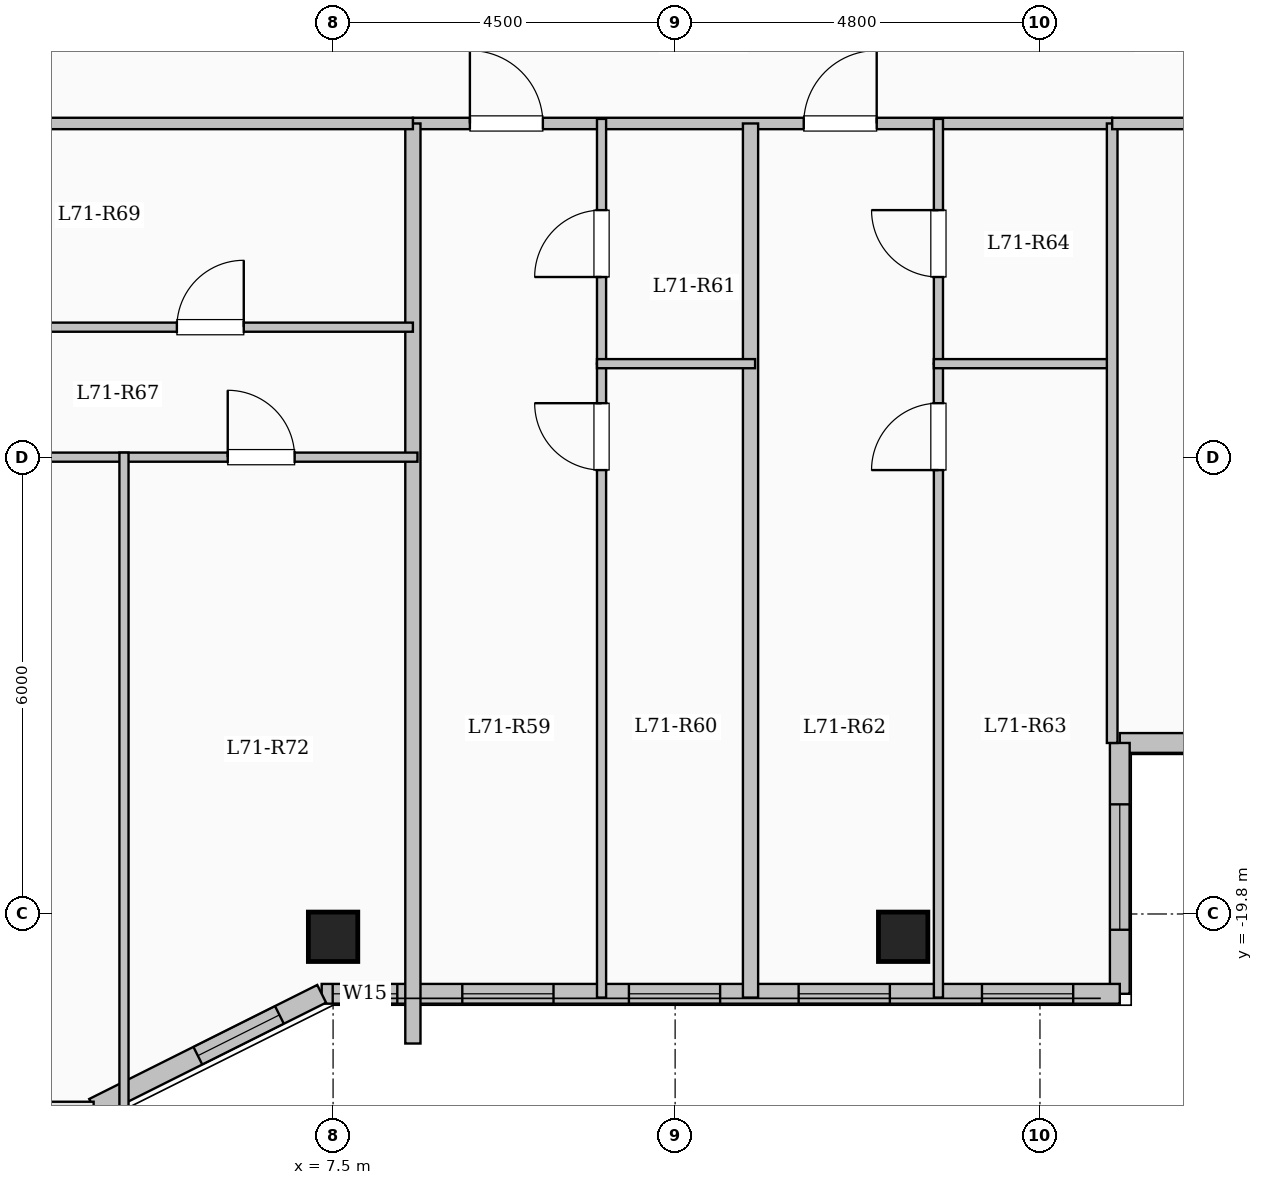
"""IFC4 building model, lengths in metres.
Left out: names, types, materials, properties, quantities, classifications, styles, units other than length and angle.
Written with IfcOpenShell. Run it as: python <this file> out.ifc"""

import sys

from ifc_helpers import new_model, si_unit, direction, frame, frame_2d, origin, origin_2d, place, context, subcontext, project, spatial, rectangle, extrude, element, fill, save


model = new_model("IFC4")
c1 = context("Model", 3, precision=1e-05, world=origin(), true_north=direction((0.0, 1.0)))
c2 = subcontext(c1, "Body", "Model", "MODEL_VIEW")
j1 = project(units=[si_unit("LENGTHUNIT", "METRE"), si_unit("PLANEANGLEUNIT", "RADIAN")], contexts=[c1])
p1 = place(None, origin())
s1 = spatial("IfcSite", under=j1, at=p1, CompositionType="ELEMENT")
p2 = place(p1, origin())
s2 = spatial("IfcBuilding", under=s1, at=p2, CompositionType="ELEMENT")
p3 = place(p2, frame((0.0, 0.0, 261.6)))
s3 = spatial("IfcBuildingStorey", under=s2, at=p3, CompositionType="ELEMENT", Elevation=261.6)
for number, where, z_axis, x_axis in (
    (1, (7.5, -20.1, 0.0), (0.0, 0.0, 1.0), (1.0, 0.0, 0.0)),
    (2, (15.0, -20.1, 0.0), (0.0, 0.0, 1.0), (1.0, 0.0, 0.0)),
):
    element("IfcColumn", number, at=place(p3, frame(where, z_axis=z_axis, x_axis=x_axis)), inside=s3, PredefinedType="COLUMN", context=c2, shape_type="SweptSolid", body=[
        extrude(rectangle(XDim=0.65, YDim=0.65, at=origin_2d()), origin(), (0.0, 0.0, 1.0), 3.35),
    ])
p4 = place(p3, frame((22.65, -17.55, 0.0), z_axis=(0.0, 0.0, 1.0), x_axis=(-1.0, 0.0, 0.0)))
e3 = element("IfcWall", 3, at=p4, inside=s3, PredefinedType="SOLIDWALL", context=c2, shape_type="SweptSolid", body=[
    extrude(rectangle(XDim=4.8, YDim=0.26, at=frame_2d((2.4, 0.0))), origin(), (0.0, 0.0, 1.0), 3.1),
])
p5 = place(p4, frame((1.325, 0.0, 0.9)))
e4 = element("IfcOpeningElement", 4, at=p5, cuts=e3, PredefinedType="OPENING", context=c2, shape_type="SweptSolid", body=[
    extrude(rectangle(XDim=2.2, YDim=1.75, at=frame_2d((1.1, 0.875))), frame((0.0, 0.14, 0.0), z_axis=(0.0, -1.0, 0.0), x_axis=(1.0, 0.0, 0.0)), (0.0, 0.0, 1.0), 0.28),
])
p6 = place(p3, frame((17.85, -17.55, 0.0), z_axis=(0.0, 0.0, 1.0), x_axis=(0.0, -1.0, 0.0)))
e5 = element("IfcWall", 5, at=p6, inside=s3, PredefinedType="SOLIDWALL", context=c2, shape_type="SweptSolid", body=[
    extrude(rectangle(XDim=3.3, YDim=0.26, at=frame_2d((1.65, 0.0))), origin(), (0.0, 0.0, 1.0), 3.1),
])
p7 = place(p6, frame((0.808, 0.0, 0.9)))
e6 = element("IfcOpeningElement", 6, at=p7, cuts=e5, PredefinedType="OPENING", context=c2, shape_type="SweptSolid", body=[
    extrude(rectangle(XDim=1.65, YDim=1.6, at=frame_2d((0.825, 0.8))), frame((0.0, 0.14, 0.0), z_axis=(0.0, -1.0, 0.0), x_axis=(1.0, 0.0, 0.0)), (0.0, 0.0, 1.0), 0.28),
])
p8 = place(p3, frame((17.85, -20.85, 0.0), z_axis=(0.0, 0.0, 1.0), x_axis=(-1.0, 0.0, 0.0)))
e7 = element("IfcWall", 7, at=p8, inside=s3, PredefinedType="SOLIDWALL", context=c2, shape_type="SweptSolid", body=[
    extrude(rectangle(XDim=10.5, YDim=0.26, at=frame_2d((5.25, 0.0))), origin(), (0.0, 0.0, 1.0), 3.1),
])
p9 = place(p8, frame((0.613, 0.0, 0.95)))
e8 = element("IfcOpeningElement", 8, at=p9, cuts=e7, PredefinedType="OPENING", context=c2, shape_type="SweptSolid", body=[
    extrude(rectangle(XDim=1.2, YDim=1.5, at=frame_2d((0.6, 0.75))), frame((0.0, 0.14, 0.0), z_axis=(0.0, -1.0, 0.0), x_axis=(1.0, 0.0, 0.0)), (0.0, 0.0, 1.0), 0.28),
])
p10 = place(p8, frame((3.025, 0.0, 0.95)))
e9 = element("IfcOpeningElement", 9, at=p10, cuts=e7, PredefinedType="OPENING", context=c2, shape_type="SweptSolid", body=[
    extrude(rectangle(XDim=1.2, YDim=1.5, at=frame_2d((0.6, 0.75))), frame((0.0, 0.14, 0.0), z_axis=(0.0, -1.0, 0.0), x_axis=(1.0, 0.0, 0.0)), (0.0, 0.0, 1.0), 0.28),
])
p11 = place(p8, frame((5.258, 0.0, 0.95)))
e10 = element("IfcOpeningElement", 10, at=p11, cuts=e7, PredefinedType="OPENING", context=c2, shape_type="SweptSolid", body=[
    extrude(rectangle(XDim=1.2, YDim=1.5, at=frame_2d((0.6, 0.75))), frame((0.0, 0.14, 0.0), z_axis=(0.0, -1.0, 0.0), x_axis=(1.0, 0.0, 0.0)), (0.0, 0.0, 1.0), 0.28),
])
p12 = place(p8, frame((7.45, 0.0, 0.95)))
e11 = element("IfcOpeningElement", 11, at=p12, cuts=e7, PredefinedType="OPENING", context=c2, shape_type="SweptSolid", body=[
    extrude(rectangle(XDim=1.2, YDim=1.5, at=frame_2d((0.6, 0.75))), frame((0.0, 0.14, 0.0), z_axis=(0.0, -1.0, 0.0), x_axis=(1.0, 0.0, 0.0)), (0.0, 0.0, 1.0), 0.28),
])
p13 = place(p8, frame((9.505, 0.0, 0.95)))
e12 = element("IfcOpeningElement", 12, at=p13, cuts=e7, PredefinedType="OPENING", context=c2, shape_type="SweptSolid", body=[
    extrude(rectangle(XDim=0.85, YDim=1.5, at=frame_2d((0.425, 0.75))), frame((0.0, 0.14, 0.0), z_axis=(0.0, -1.0, 0.0), x_axis=(1.0, 0.0, 0.0)), (0.0, 0.0, 1.0), 0.28),
])
p14 = place(p3, frame((7.35, -20.85, 0.0), z_axis=(0.0, 0.0, 1.0), x_axis=(-0.894427191, -0.4472135955, 0.0)))
e13 = element("IfcWall", 13, at=p14, inside=s3, PredefinedType="SOLIDWALL", context=c2, shape_type="SweptSolid", body=[
    extrude(rectangle(XDim=3.354, YDim=0.26, at=frame_2d((1.677, 0.0))), origin(), (0.0, 0.0, 1.0), 3.1),
])
p15 = place(p14, frame((0.622, 0.0, 0.95)))
e14 = element("IfcOpeningElement", 14, at=p15, cuts=e13, PredefinedType="OPENING", context=c2, shape_type="SweptSolid", body=[
    extrude(rectangle(XDim=1.2, YDim=1.5, at=frame_2d((0.6, 0.75))), frame((0.0, 0.14, 0.0), z_axis=(0.0, -1.0, 0.0), x_axis=(1.0, 0.0, 0.0)), (0.0, 0.0, 1.0), 0.28),
])
p16 = place(p3, frame((8.55, -9.4, 0.0), z_axis=(0.0, 0.0, 1.0), x_axis=(1.0, 0.0, 0.0)))
e15 = element("IfcWall", 15, at=p16, inside=s3, PredefinedType="PARTITIONING", context=c2, shape_type="SweptSolid", body=[
    extrude(rectangle(XDim=9.2, YDim=0.15, at=frame_2d((4.6, 0.0))), origin(), (0.0, 0.0, 1.0), 3.1),
])
p17 = place(p16, frame((0.75, 0.0, 0.0)))
e16 = element("IfcOpeningElement", 16, at=p17, cuts=e15, PredefinedType="OPENING", context=c2, shape_type="SweptSolid", body=[
    extrude(rectangle(XDim=0.96, YDim=2.15, at=frame_2d((0.48, 1.075))), frame((0.0, 0.085, 0.0), z_axis=(0.0, -1.0, 0.0), x_axis=(1.0, 0.0, 0.0)), (0.0, 0.0, 1.0), 0.17),
])
p18 = place(p16, frame((5.142, 0.0, 0.0)))
e17 = element("IfcOpeningElement", 17, at=p18, cuts=e15, PredefinedType="OPENING", context=c2, shape_type="SweptSolid", body=[
    extrude(rectangle(XDim=0.96, YDim=2.15, at=frame_2d((0.48, 1.075))), frame((0.0, 0.085, 0.0), z_axis=(0.0, -1.0, 0.0), x_axis=(1.0, 0.0, 0.0)), (0.0, 0.0, 1.0), 0.17),
])
p19 = place(p3, frame((12.992, -20.9, 0.0), z_axis=(0.0, 0.0, 1.0), x_axis=(0.0, 1.0, 0.0)))
e18 = element("IfcWall", 18, at=p19, inside=s3, PredefinedType="SOLIDWALL", context=c2, shape_type="SweptSolid", body=[
    extrude(rectangle(XDim=11.5, YDim=0.2, at=frame_2d((5.75, 0.0))), origin(), (0.0, 0.0, 1.0), 3.1),
])
p20 = place(p3, frame((11.032, -20.9, 0.0), z_axis=(0.0, 0.0, 1.0), x_axis=(0.0, 1.0, 0.0)))
e19 = element("IfcWall", 19, at=p20, inside=s3, PredefinedType="PARTITIONING", context=c2, shape_type="SweptSolid", body=[
    extrude(rectangle(XDim=8.34, YDim=0.12, at=frame_2d((4.17, 0.0))), origin(), (0.0, 0.0, 1.0), 3.1),
])
p21 = place(p20, frame((6.94, 0.0, 0.0)))
e20 = element("IfcOpeningElement", 20, at=p21, cuts=e19, PredefinedType="OPENING", context=c2, shape_type="SweptSolid", body=[
    extrude(rectangle(XDim=0.88, YDim=2.1, at=frame_2d((0.44, 1.05))), frame((0.0, 0.07, 0.0), z_axis=(0.0, -1.0, 0.0), x_axis=(1.0, 0.0, 0.0)), (0.0, 0.0, 1.0), 0.14),
])
p22 = place(p3, frame((11.032, -12.56, 0.0), z_axis=(0.0, 0.0, 1.0), x_axis=(0.0, 1.0, 0.0)))
e21 = element("IfcWall", 21, at=p22, inside=s3, PredefinedType="PARTITIONING", context=c2, shape_type="SweptSolid", body=[
    extrude(rectangle(XDim=3.22, YDim=0.12, at=frame_2d((1.61, 0.0))), origin(), (0.0, 0.0, 1.0), 3.1),
])
p23 = place(p22, frame((1.14, 0.0, 0.0)))
e22 = element("IfcOpeningElement", 22, at=p23, cuts=e21, PredefinedType="OPENING", context=c2, shape_type="SweptSolid", body=[
    extrude(rectangle(XDim=0.88, YDim=2.1, at=frame_2d((0.44, 1.05))), frame((0.0, 0.07, 0.0), z_axis=(0.0, -1.0, 0.0), x_axis=(1.0, 0.0, 0.0)), (0.0, 0.0, 1.0), 0.14),
])
p24 = place(p3, frame((10.972, -12.56, 0.0), z_axis=(0.0, 0.0, 1.0), x_axis=(1.0, 0.0, 0.0)))
e23 = element("IfcWall", 23, at=p24, inside=s3, PredefinedType="PARTITIONING", context=c2, shape_type="SweptSolid", body=[
    extrude(rectangle(XDim=2.08, YDim=0.12, at=frame_2d((1.04, 0.0))), origin(), (0.0, 0.0, 1.0), 2.785),
])
p25 = place(p3, frame((15.464, -20.9, 0.0), z_axis=(0.0, 0.0, 1.0), x_axis=(0.0, 1.0, 0.0)))
e24 = element("IfcWall", 24, at=p25, inside=s3, PredefinedType="PARTITIONING", context=c2, shape_type="SweptSolid", body=[
    extrude(rectangle(XDim=8.34, YDim=0.12, at=frame_2d((4.17, 0.0))), origin(), (0.0, 0.0, 1.0), 3.1),
])
p26 = place(p25, frame((6.94, 0.0, 0.0)))
e25 = element("IfcOpeningElement", 25, at=p26, cuts=e24, PredefinedType="OPENING", context=c2, shape_type="SweptSolid", body=[
    extrude(rectangle(XDim=0.88, YDim=2.1, at=frame_2d((0.44, 1.05))), frame((0.0, 0.07, 0.0), z_axis=(0.0, -1.0, 0.0), x_axis=(1.0, 0.0, 0.0)), (0.0, 0.0, 1.0), 0.14),
])
p27 = place(p3, frame((15.464, -12.56, 0.0), z_axis=(0.0, 0.0, 1.0), x_axis=(0.0, 1.0, 0.0)))
e26 = element("IfcWall", 26, at=p27, inside=s3, PredefinedType="PARTITIONING", context=c2, shape_type="SweptSolid", body=[
    extrude(rectangle(XDim=3.22, YDim=0.12, at=frame_2d((1.61, 0.0))), origin(), (0.0, 0.0, 1.0), 3.1),
])
p28 = place(p27, frame((1.14, 0.0, 0.0)))
e27 = element("IfcOpeningElement", 27, at=p28, cuts=e26, PredefinedType="OPENING", context=c2, shape_type="SweptSolid", body=[
    extrude(rectangle(XDim=0.88, YDim=2.1, at=frame_2d((0.44, 1.05))), frame((0.0, 0.07, 0.0), z_axis=(0.0, -1.0, 0.0), x_axis=(1.0, 0.0, 0.0)), (0.0, 0.0, 1.0), 0.14),
])
p29 = place(p3, frame((15.404, -12.56, 0.0), z_axis=(0.0, 0.0, 1.0), x_axis=(1.0, 0.0, 0.0)))
e28 = element("IfcWall", 28, at=p29, inside=s3, PredefinedType="PARTITIONING", context=c2, shape_type="SweptSolid", body=[
    extrude(rectangle(XDim=2.406, YDim=0.12, at=frame_2d((1.203, 0.0))), origin(), (0.0, 0.0, 1.0), 3.1),
])
p30 = place(p3, frame((8.55, -21.504, 0.0), z_axis=(0.0, 0.0, 1.0), x_axis=(0.0, 1.0, 0.0)))
e29 = element("IfcWall", 29, at=p30, inside=s3, PredefinedType="SOLIDWALL", context=c2, shape_type="SweptSolid", body=[
    extrude(rectangle(XDim=12.104, YDim=0.2, at=frame_2d((6.052, 0.0))), origin(), (0.0, 0.0, 1.0), 3.1),
])
p31 = place(p3, frame((-8.55, -9.4, 0.0), z_axis=(0.0, 0.0, 1.0), x_axis=(1.0, 0.0, 0.0)))
e30 = element("IfcWall", 30, at=p31, inside=s3, PredefinedType="PARTITIONING", context=c2, shape_type="SweptSolid", body=[
    extrude(rectangle(XDim=17.1, YDim=0.15, at=frame_2d((8.55, 0.0))), origin(), (0.0, 0.0, 1.0), 3.1),
])
p32 = place(p31, frame((1.75, 0.0, 0.0)))
e31 = element("IfcOpeningElement", 31, at=p32, cuts=e30, PredefinedType="OPENING", context=c2, shape_type="SweptSolid", body=[
    extrude(rectangle(XDim=0.96, YDim=2.15, at=frame_2d((0.48, 1.075))), frame((0.0, 0.085, 0.0), z_axis=(0.0, -1.0, 0.0), x_axis=(1.0, 0.0, 0.0)), (0.0, 0.0, 1.0), 0.17),
])
p33 = place(p3, frame((3.219, -12.08, 0.0), z_axis=(0.0, 0.0, 1.0), x_axis=(1.0, 0.0, 0.0)))
e32 = element("IfcWall", 32, at=p33, inside=s3, PredefinedType="PARTITIONING", context=c2, shape_type="SweptSolid", body=[
    extrude(rectangle(XDim=5.331, YDim=0.12, at=frame_2d((2.666, 0.0))), origin(), (0.0, 0.0, 1.0), 2.785),
])
p34 = place(p33, frame((2.226, 0.0, 0.0)))
e33 = element("IfcOpeningElement", 33, at=p34, cuts=e32, PredefinedType="OPENING", context=c2, shape_type="SweptSolid", body=[
    extrude(rectangle(XDim=0.88, YDim=2.1, at=frame_2d((0.44, 1.05))), frame((0.0, 0.07, 0.0), z_axis=(0.0, -1.0, 0.0), x_axis=(1.0, 0.0, 0.0)), (0.0, 0.0, 1.0), 0.14),
])
p35 = place(p3, frame((-2.774, -13.79, 0.0), z_axis=(0.0, 0.0, 1.0), x_axis=(1.0, 0.0, 0.0)))
e34 = element("IfcWall", 34, at=p35, inside=s3, PredefinedType="PARTITIONING", context=c2, shape_type="SweptSolid", body=[
    extrude(rectangle(XDim=11.384, YDim=0.12, at=frame_2d((5.692, 0.0))), origin(), (0.0, 0.0, 1.0), 2.785),
])
p36 = place(p35, frame((1.426, 0.0, 0.0)))
e35 = element("IfcOpeningElement", 35, at=p36, cuts=e34, PredefinedType="OPENING", context=c2, shape_type="SweptSolid", body=[
    extrude(rectangle(XDim=0.88, YDim=2.1, at=frame_2d((0.44, 1.05))), frame((0.0, 0.07, 0.0), z_axis=(0.0, -1.0, 0.0), x_axis=(1.0, 0.0, 0.0)), (0.0, 0.0, 1.0), 0.14),
])
p37 = place(p35, frame((5.157, 0.0, 0.0)))
e36 = element("IfcOpeningElement", 36, at=p37, cuts=e34, PredefinedType="OPENING", context=c2, shape_type="SweptSolid", body=[
    extrude(rectangle(XDim=0.88, YDim=2.1, at=frame_2d((0.44, 1.05))), frame((0.0, 0.07, 0.0), z_axis=(0.0, -1.0, 0.0), x_axis=(1.0, 0.0, 0.0)), (0.0, 0.0, 1.0), 0.14),
])
p38 = place(p35, frame((8.888, 0.0, 0.0)))
e37 = element("IfcOpeningElement", 37, at=p38, cuts=e34, PredefinedType="OPENING", context=c2, shape_type="SweptSolid", body=[
    extrude(rectangle(XDim=0.88, YDim=2.1, at=frame_2d((0.44, 1.05))), frame((0.0, 0.07, 0.0), z_axis=(0.0, -1.0, 0.0), x_axis=(1.0, 0.0, 0.0)), (0.0, 0.0, 1.0), 0.14),
])
p39 = place(p3, frame((4.749, -22.38, 0.0), z_axis=(0.0, 0.0, 1.0), x_axis=(0.0, 1.0, 0.0)))
e38 = element("IfcWall", 38, at=p39, inside=s3, PredefinedType="PARTITIONING", context=c2, shape_type="SweptSolid", body=[
    extrude(rectangle(XDim=8.65, YDim=0.12, at=frame_2d((4.325, 0.0))), origin(), (0.0, 0.0, 1.0), 3.1),
])
p40 = place(p3, frame((17.75, -17.55, 0.0), z_axis=(0.0, 0.0, 1.0), x_axis=(0.0, 1.0, 0.0)))
e39 = element("IfcWall", 39, at=p40, inside=s3, PredefinedType="PARTITIONING", context=c2, shape_type="SweptSolid", body=[
    extrude(rectangle(XDim=8.15, YDim=0.14, at=frame_2d((4.075, 0.0))), origin(), (0.0, 0.0, 1.0), 3.1),
])
p41 = place(p3, frame((17.75, -9.4, 0.0), z_axis=(0.0, 0.0, 1.0), x_axis=(1.0, 0.0, 0.0)))
e40 = element("IfcWall", 40, at=p41, inside=s3, PredefinedType="PARTITIONING", context=c2, shape_type="SweptSolid", body=[
    extrude(rectangle(XDim=4.93, YDim=0.15, at=frame_2d((2.465, 0.0))), origin(), (0.0, 0.0, 1.0), 3.1),
])
p42 = place(p41, frame((1.99, 0.0, 0.0)))
e41 = element("IfcOpeningElement", 41, at=p42, cuts=e40, PredefinedType="OPENING", context=c2, shape_type="SweptSolid", body=[
    extrude(rectangle(XDim=0.95, YDim=2.15, at=frame_2d((0.475, 1.075))), frame((0.0, 0.085, 0.0), z_axis=(0.0, -1.0, 0.0), x_axis=(1.0, 0.0, 0.0)), (0.0, 0.0, 1.0), 0.17),
])
p43 = place(p7, origin())
e42 = element("IfcWindow", 42, at=p43, inside=s3, PartitioningType="SINGLE_PANEL", PredefinedType="WINDOW", context=c2, shape_type="SweptSolid", body=[
    extrude(rectangle(XDim=1.65, YDim=1.6, at=frame_2d((0.825, 0.8))), frame((0.0, 0.03, 0.0), z_axis=(0.0, -1.0, 0.0), x_axis=(1.0, 0.0, 0.0)), (0.0, 0.0, 1.0), 0.06),
])
fill(e6, e42)
p44 = place(p9, origin())
e43 = element("IfcWindow", 43, at=p44, inside=s3, PartitioningType="SINGLE_PANEL", PredefinedType="WINDOW", context=c2, shape_type="SweptSolid", body=[
    extrude(rectangle(XDim=1.2, YDim=1.5, at=frame_2d((0.6, 0.75))), frame((0.0, 0.03, 0.0), z_axis=(0.0, -1.0, 0.0), x_axis=(1.0, 0.0, 0.0)), (0.0, 0.0, 1.0), 0.06),
])
fill(e8, e43)
p45 = place(p10, origin())
e44 = element("IfcWindow", 44, at=p45, inside=s3, PartitioningType="SINGLE_PANEL", PredefinedType="WINDOW", context=c2, shape_type="SweptSolid", body=[
    extrude(rectangle(XDim=1.2, YDim=1.5, at=frame_2d((0.6, 0.75))), frame((0.0, 0.03, 0.0), z_axis=(0.0, -1.0, 0.0), x_axis=(1.0, 0.0, 0.0)), (0.0, 0.0, 1.0), 0.06),
])
fill(e9, e44)
p46 = place(p11, origin())
e45 = element("IfcWindow", 45, at=p46, inside=s3, PartitioningType="SINGLE_PANEL", PredefinedType="WINDOW", context=c2, shape_type="SweptSolid", body=[
    extrude(rectangle(XDim=1.2, YDim=1.5, at=frame_2d((0.6, 0.75))), frame((0.0, 0.03, 0.0), z_axis=(0.0, -1.0, 0.0), x_axis=(1.0, 0.0, 0.0)), (0.0, 0.0, 1.0), 0.06),
])
fill(e10, e45)
p47 = place(p12, origin())
e46 = element("IfcWindow", 46, at=p47, inside=s3, PartitioningType="SINGLE_PANEL", PredefinedType="WINDOW", context=c2, shape_type="SweptSolid", body=[
    extrude(rectangle(XDim=1.2, YDim=1.5, at=frame_2d((0.6, 0.75))), frame((0.0, 0.03, 0.0), z_axis=(0.0, -1.0, 0.0), x_axis=(1.0, 0.0, 0.0)), (0.0, 0.0, 1.0), 0.06),
])
fill(e11, e46)
p48 = place(p13, origin())
e47 = element("IfcWindow", 47, at=p48, inside=s3, PartitioningType="SINGLE_PANEL", PredefinedType="WINDOW", context=c2, shape_type="SweptSolid", body=[
    extrude(rectangle(XDim=0.85, YDim=1.5, at=frame_2d((0.425, 0.75))), frame((0.0, 0.03, 0.0), z_axis=(0.0, -1.0, 0.0), x_axis=(1.0, 0.0, 0.0)), (0.0, 0.0, 1.0), 0.06),
])
fill(e12, e47)
p49 = place(p15, origin())
e48 = element("IfcWindow", 48, at=p49, inside=s3, PartitioningType="SINGLE_PANEL", PredefinedType="WINDOW", context=c2, shape_type="SweptSolid", body=[
    extrude(rectangle(XDim=1.2, YDim=1.5, at=frame_2d((0.6, 0.75))), frame((0.0, 0.03, 0.0), z_axis=(0.0, -1.0, 0.0), x_axis=(1.0, 0.0, 0.0)), (0.0, 0.0, 1.0), 0.06),
])
fill(e14, e48)
p50 = place(p17, origin())
e49 = element("IfcDoor", 49, at=p50, inside=s3, OperationType="SINGLE_SWING_LEFT", PredefinedType="DOOR", context=c2, shape_type="SweptSolid", body=[
    extrude(rectangle(XDim=0.96, YDim=2.15, at=frame_2d((0.48, 1.075))), frame((0.0, 0.025, 0.0), z_axis=(0.0, -1.0, 0.0), x_axis=(1.0, 0.0, 0.0)), (0.0, 0.0, 1.0), 0.05),
])
fill(e16, e49)
p51 = place(p21, origin())
e50 = element("IfcDoor", 50, at=p51, inside=s3, OperationType="SINGLE_SWING_RIGHT", PredefinedType="DOOR", context=c2, shape_type="SweptSolid", body=[
    extrude(rectangle(XDim=0.88, YDim=2.1, at=frame_2d((0.44, 1.05))), frame((0.0, 0.025, 0.0), z_axis=(0.0, -1.0, 0.0), x_axis=(1.0, 0.0, 0.0)), (0.0, 0.0, 1.0), 0.05),
])
fill(e20, e50)
p52 = place(p23, origin())
e51 = element("IfcDoor", 51, at=p52, inside=s3, OperationType="SINGLE_SWING_LEFT", PredefinedType="DOOR", context=c2, shape_type="SweptSolid", body=[
    extrude(rectangle(XDim=0.88, YDim=2.1, at=frame_2d((0.44, 1.05))), frame((0.0, 0.025, 0.0), z_axis=(0.0, -1.0, 0.0), x_axis=(1.0, 0.0, 0.0)), (0.0, 0.0, 1.0), 0.05),
])
fill(e22, e51)
p53 = place(p18, origin())
e52 = element("IfcDoor", 52, at=p53, inside=s3, OperationType="SINGLE_SWING_RIGHT", PredefinedType="DOOR", context=c2, shape_type="SweptSolid", body=[
    extrude(rectangle(XDim=0.96, YDim=2.15, at=frame_2d((0.48, 1.075))), frame((0.0, 0.025, 0.0), z_axis=(0.0, -1.0, 0.0), x_axis=(1.0, 0.0, 0.0)), (0.0, 0.0, 1.0), 0.05),
])
fill(e17, e52)
p54 = place(p26, origin())
e53 = element("IfcDoor", 53, at=p54, inside=s3, OperationType="SINGLE_SWING_LEFT", PredefinedType="DOOR", context=c2, shape_type="SweptSolid", body=[
    extrude(rectangle(XDim=0.88, YDim=2.1, at=frame_2d((0.44, 1.05))), frame((0.0, 0.025, 0.0), z_axis=(0.0, -1.0, 0.0), x_axis=(1.0, 0.0, 0.0)), (0.0, 0.0, 1.0), 0.05),
])
fill(e25, e53)
p55 = place(p28, origin())
e54 = element("IfcDoor", 54, at=p55, inside=s3, OperationType="SINGLE_SWING_RIGHT", PredefinedType="DOOR", context=c2, shape_type="SweptSolid", body=[
    extrude(rectangle(XDim=0.88, YDim=2.1, at=frame_2d((0.44, 1.05))), frame((0.0, 0.025, 0.0), z_axis=(0.0, -1.0, 0.0), x_axis=(1.0, 0.0, 0.0)), (0.0, 0.0, 1.0), 0.05),
])
fill(e27, e54)
p56 = place(p34, origin())
e55 = element("IfcDoor", 55, at=p56, inside=s3, OperationType="SINGLE_SWING_RIGHT", PredefinedType="DOOR", context=c2, shape_type="SweptSolid", body=[
    extrude(rectangle(XDim=0.88, YDim=2.1, at=frame_2d((0.44, 1.05))), frame((0.0, 0.025, 0.0), z_axis=(0.0, -1.0, 0.0), x_axis=(1.0, 0.0, 0.0)), (0.0, 0.0, 1.0), 0.05),
])
fill(e33, e55)
p57 = place(p38, origin())
e56 = element("IfcDoor", 56, at=p57, inside=s3, OperationType="SINGLE_SWING_LEFT", PredefinedType="DOOR", context=c2, shape_type="SweptSolid", body=[
    extrude(rectangle(XDim=0.88, YDim=2.1, at=frame_2d((0.44, 1.05))), frame((0.0, 0.025, 0.0), z_axis=(0.0, -1.0, 0.0), x_axis=(1.0, 0.0, 0.0)), (0.0, 0.0, 1.0), 0.05),
])
fill(e37, e56)
save(model, sys.argv[1])
